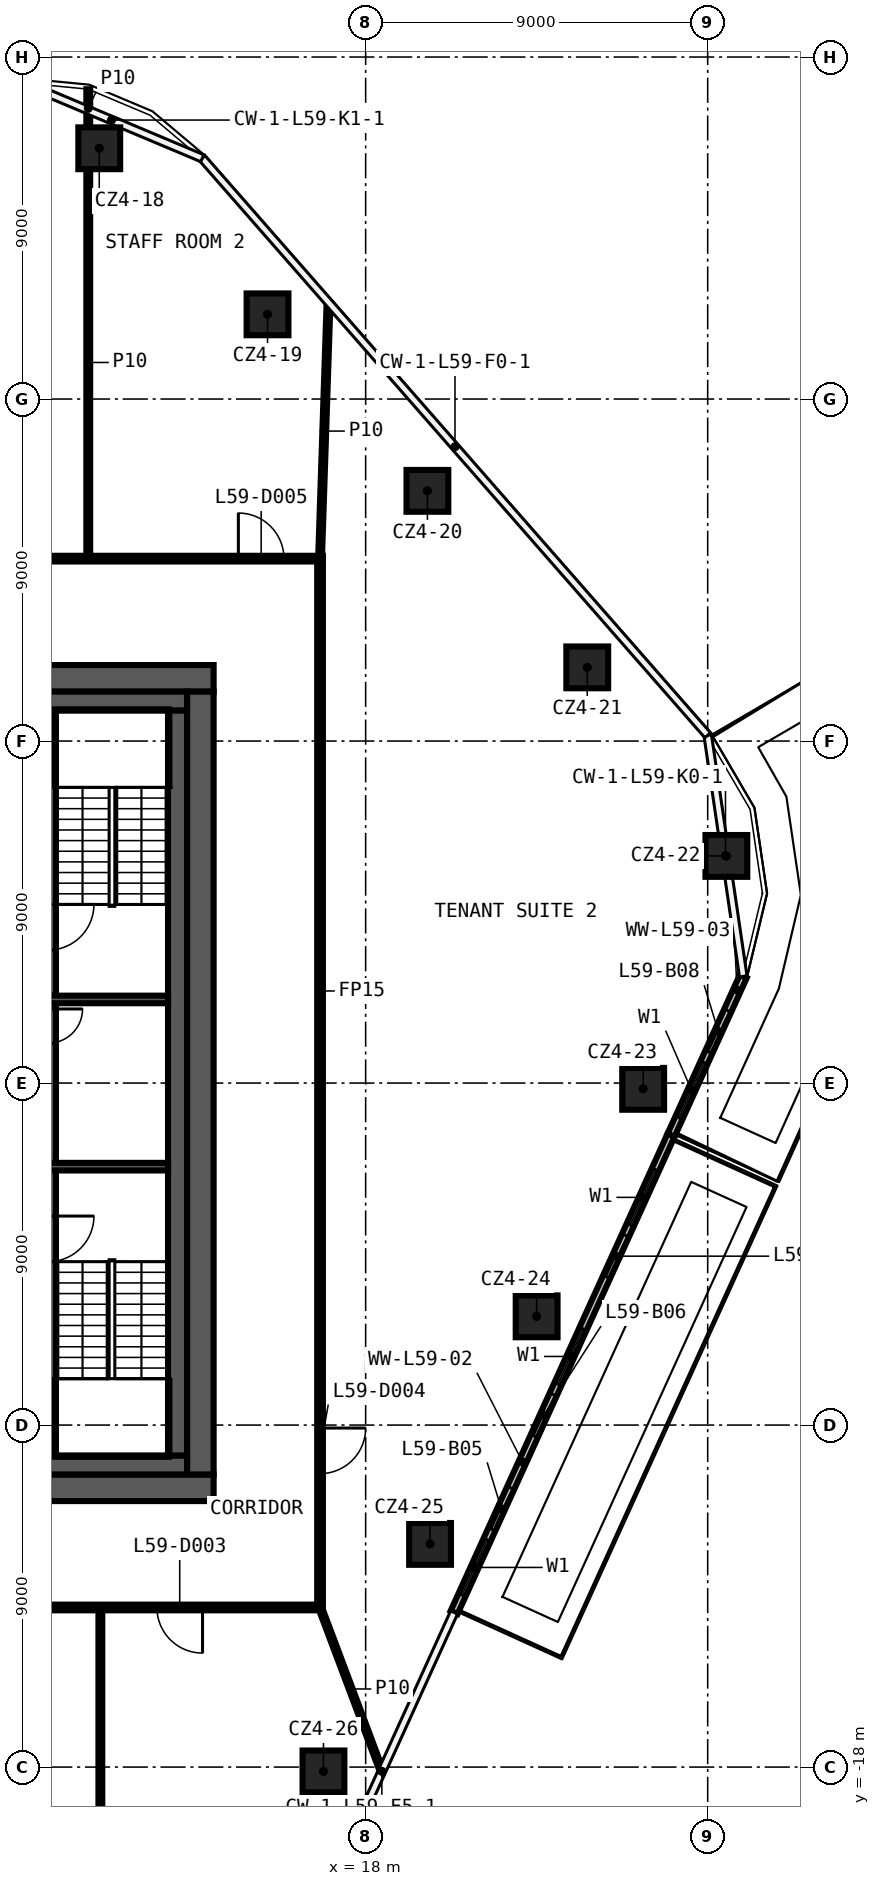
"""IFC4 building model, lengths in metres.
Left out: names, types, materials, properties, quantities, classifications, styles, units other than length and angle.
Written with IfcOpenShell. Run it as: python <this file> out.ifc"""

import sys

from ifc_helpers import new_model, si_unit, direction, frame, frame_2d, origin, origin_2d, place, context, subcontext, project, spatial, rectangle, extrude, element, fill, save


model = new_model("IFC4")
c1 = context("Model", 3, precision=1e-05, world=origin(), true_north=direction((0.0, 1.0)))
c2 = subcontext(c1, "Body", "Model", "MODEL_VIEW")
j1 = project(units=[si_unit("LENGTHUNIT", "METRE"), si_unit("PLANEANGLEUNIT", "RADIAN")], contexts=[c1])
p1 = place(None, origin())
s1 = spatial("IfcSite", under=j1, at=p1, CompositionType="ELEMENT")
p2 = place(p1, origin())
s2 = spatial("IfcBuilding", under=s1, at=p2, CompositionType="ELEMENT")
p3 = place(p2, frame((0.0, 0.0, 279.0)))
s3 = spatial("IfcBuildingStorey", under=s2, at=p3, CompositionType="ELEMENT", Elevation=279.0)
for number, where, z_axis, x_axis in (
    (1, (10.99, 24.599, 0.0), (0.0, 0.0, 1.0), (1.0, 0.0, 0.0)),
    (2, (15.418, 20.229, 0.0), (0.0, 0.0, 1.0), (1.0, 0.0, 0.0)),
    (3, (19.625, 15.584, 0.0), (0.0, 0.0, 1.0), (1.0, 0.0, 0.0)),
    (4, (23.831, 10.939, 0.0), (0.0, 0.0, 1.0), (1.0, 0.0, 0.0)),
    (5, (27.492, 5.977, 0.0), (0.0, 0.0, 1.0), (1.0, 0.0, 0.0)),
    (6, (25.302, -0.152, 0.0), (0.0, 0.0, 1.0), (1.0, 0.0, 0.0)),
    (7, (22.499, -6.139, 0.0), (0.0, 0.0, 1.0), (1.0, 0.0, 0.0)),
    (8, (19.695, -12.127, 0.0), (0.0, 0.0, 1.0), (1.0, 0.0, 0.0)),
    (9, (16.89, -18.114, 0.0), (0.0, 0.0, 1.0), (1.0, 0.0, 0.0)),
):
    element("IfcColumn", number, at=place(p3, frame(where, z_axis=z_axis, x_axis=x_axis)), inside=s3, PredefinedType="COLUMN", context=c2, shape_type="SweptSolid", body=[
        extrude(rectangle(XDim=1.1, YDim=1.1, at=origin_2d()), origin(), (0.0, 0.0, 1.0), 3.6),
    ])
p4 = place(p3, frame((16.875, -13.8, 0.0), z_axis=(0.0, 0.0, 1.0), x_axis=(-1.0, 0.0, 0.0)))
e10 = element("IfcWall", 10, at=p4, inside=s3, PredefinedType="PARTITIONING", context=c2, shape_type="SweptSolid", body=[
    extrude(rectangle(XDim=28.95, YDim=0.15, at=frame_2d((14.475, 0.0))), origin(), (0.0, 0.0, 1.0), 3.6),
])
p5 = place(p4, frame((22.698, 0.0, 0.0)))
e11 = element("IfcOpeningElement", 11, at=p5, cuts=e10, PredefinedType="OPENING", context=c2, shape_type="SweptSolid", body=[
    extrude(rectangle(XDim=1.2, YDim=2.1, at=frame_2d((0.6, 1.05))), frame((0.0, 0.085, 0.0), z_axis=(0.0, -1.0, 0.0), x_axis=(1.0, 0.0, 0.0)), (0.0, 0.0, 1.0), 0.17),
])
p6 = place(p4, frame((12.727, 0.0, 0.0)))
e12 = element("IfcOpeningElement", 12, at=p6, cuts=e10, PredefinedType="OPENING", context=c2, shape_type="SweptSolid", body=[
    extrude(rectangle(XDim=1.2, YDim=2.1, at=frame_2d((0.6, 1.05))), frame((0.0, 0.085, 0.0), z_axis=(0.0, -1.0, 0.0), x_axis=(1.0, 0.0, 0.0)), (0.0, 0.0, 1.0), 0.17),
])
p7 = place(p4, frame((3.167, 0.0, 0.0)))
e13 = element("IfcOpeningElement", 13, at=p7, cuts=e10, PredefinedType="OPENING", context=c2, shape_type="SweptSolid", body=[
    extrude(rectangle(XDim=1.2, YDim=2.1, at=frame_2d((0.6, 1.05))), frame((0.0, 0.085, 0.0), z_axis=(0.0, -1.0, 0.0), x_axis=(1.0, 0.0, 0.0)), (0.0, 0.0, 1.0), 0.17),
])
p8 = place(p3, frame((-12.075, 13.8, 0.0), z_axis=(0.0, 0.0, 1.0), x_axis=(1.0, 0.0, 0.0)))
e14 = element("IfcWall", 14, at=p8, inside=s3, PredefinedType="PARTITIONING", context=c2, shape_type="SweptSolid", body=[
    extrude(rectangle(XDim=28.95, YDim=0.15, at=frame_2d((14.475, 0.0))), origin(), (0.0, 0.0, 1.0), 3.6),
])
p9 = place(p8, frame((26.725, 0.0, 0.0)))
e15 = element("IfcOpeningElement", 15, at=p9, cuts=e14, PredefinedType="OPENING", context=c2, shape_type="SweptSolid", body=[
    extrude(rectangle(XDim=1.2, YDim=2.1, at=frame_2d((0.6, 1.05))), frame((0.0, 0.085, 0.0), z_axis=(0.0, -1.0, 0.0), x_axis=(1.0, 0.0, 0.0)), (0.0, 0.0, 1.0), 0.17),
])
p10 = place(p8, frame((2.445, 0.0, 0.0)))
e16 = element("IfcOpeningElement", 16, at=p10, cuts=e14, PredefinedType="OPENING", context=c2, shape_type="SweptSolid", body=[
    extrude(rectangle(XDim=1.2, YDim=2.1, at=frame_2d((0.6, 1.05))), frame((0.0, 0.085, 0.0), z_axis=(0.0, -1.0, 0.0), x_axis=(1.0, 0.0, 0.0)), (0.0, 0.0, 1.0), 0.17),
])
p11 = place(p3, frame((16.8, 13.8, 0.0), z_axis=(0.0, 0.0, 1.0), x_axis=(0.033145414265, 0.999450539803, 0.0)))
e17 = element("IfcWall", 17, at=p11, inside=s3, PredefinedType="PARTITIONING", context=c2, shape_type="SweptSolid", body=[
    extrude(rectangle(XDim=6.718, YDim=0.1, at=frame_2d((3.359, 0.0))), origin(), (0.0, 0.0, 1.0), 3.6),
])
p12 = place(p3, frame((16.8, 13.725, 0.0), z_axis=(0.0, 0.0, 1.0), x_axis=(0.0, -1.0, 0.0)))
e18 = element("IfcWall", 18, at=p12, inside=s3, PredefinedType="PARTITIONING", context=c2, shape_type="SweptSolid", body=[
    extrude(rectangle(XDim=27.45, YDim=0.15, at=frame_2d((13.725, 0.0))), origin(), (0.0, 0.0, 1.0), 3.6),
])
p13 = place(p12, frame((22.803, 0.0, 0.0)))
e19 = element("IfcOpeningElement", 19, at=p13, cuts=e18, PredefinedType="OPENING", context=c2, shape_type="SweptSolid", body=[
    extrude(rectangle(XDim=1.2, YDim=2.1, at=frame_2d((0.6, 1.05))), frame((0.0, 0.085, 0.0), z_axis=(0.0, -1.0, 0.0), x_axis=(1.0, 0.0, 0.0)), (0.0, 0.0, 1.0), 0.17),
])
p14 = place(p3, frame((11.019, -25.74, 0.0), z_axis=(0.0, 0.0, 1.0), x_axis=(0.0, 1.0, 0.0)))
e20 = element("IfcWall", 20, at=p14, inside=s3, PredefinedType="PARTITIONING", context=c2, shape_type="SweptSolid", body=[
    extrude(rectangle(XDim=11.865, YDim=0.1, at=frame_2d((5.932, 0.0))), origin(), (0.0, 0.0, 1.0), 3.6),
])
p15 = place(p3, frame((10.701, 13.875, 0.0), z_axis=(0.0, 0.0, 1.0), x_axis=(0.0, 1.0, 0.0)))
e21 = element("IfcWall", 21, at=p15, inside=s3, PredefinedType="PARTITIONING", context=c2, shape_type="SweptSolid", body=[
    extrude(rectangle(XDim=10.174, YDim=0.1, at=frame_2d((5.087, 0.0))), origin(), (0.0, 0.0, 1.0), 3.6),
])
p16 = place(p3, frame((10.701, 25.149, 0.0), z_axis=(0.0, 0.0, 1.0), x_axis=(0.0, 1.0, 0.0)))
e22 = element("IfcWall", 22, at=p16, inside=s3, PredefinedType="PARTITIONING", context=c2, shape_type="SweptSolid", body=[
    extrude(rectangle(XDim=1.004, YDim=0.1, at=frame_2d((0.502, 0.0))), origin(), (0.0, 0.0, 1.0), 3.6),
])
p17 = place(p3, frame((16.8, -13.8, 0.0), z_axis=(0.0, 0.0, 1.0), x_axis=(0.352127226584, -0.935952144235, 0.0)))
e23 = element("IfcWall", 23, at=p17, inside=s3, PredefinedType="PARTITIONING", context=c2, shape_type="SweptSolid", body=[
    extrude(rectangle(XDim=4.583, YDim=0.1, at=frame_2d((2.292, 0.0))), origin(), (0.0, 0.0, 1.0), 3.6),
])
p18 = place(p3, frame((20.327, -13.93, 0.0), z_axis=(0.0, 0.0, 1.0), x_axis=(0.413844275504, 0.91034768942, 0.0)))
e24 = element("IfcWall", 24, at=p18, inside=s3, PredefinedType="SOLIDWALL", context=c2, shape_type="SweptSolid", body=[
    extrude(rectangle(XDim=13.796, YDim=0.2, at=frame_2d((6.898, 0.0))), origin(), (0.0, 0.0, 1.0), 3.6),
])
p19 = place(p18, frame((0.5, 0.0, 0.6)))
e25 = element("IfcOpeningElement", 25, at=p19, cuts=e24, PredefinedType="OPENING", context=c2, shape_type="SweptSolid", body=[
    extrude(rectangle(XDim=1.6, YDim=2.4, at=frame_2d((0.8, 1.2))), frame((0.0, 0.11, 0.0), z_axis=(0.0, -1.0, 0.0), x_axis=(1.0, 0.0, 0.0)), (0.0, 0.0, 1.0), 0.22),
])
p20 = place(p18, frame((2.4, 0.0, 0.0)))
e26 = element("IfcOpeningElement", 26, at=p20, cuts=e24, PredefinedType="OPENING", context=c2, shape_type="SweptSolid", body=[
    extrude(rectangle(XDim=1.2, YDim=2.4, at=frame_2d((0.6, 1.2))), frame((0.0, 0.11, 0.0), z_axis=(0.0, -1.0, 0.0), x_axis=(1.0, 0.0, 0.0)), (0.0, 0.0, 1.0), 0.22),
])
p21 = place(p18, frame((6.599, 0.0, 0.6)))
e27 = element("IfcOpeningElement", 27, at=p21, cuts=e24, PredefinedType="OPENING", context=c2, shape_type="SweptSolid", body=[
    extrude(rectangle(XDim=1.6, YDim=2.4, at=frame_2d((0.8, 1.2))), frame((0.0, 0.11, 0.0), z_axis=(0.0, -1.0, 0.0), x_axis=(1.0, 0.0, 0.0)), (0.0, 0.0, 1.0), 0.22),
])
p22 = place(p18, frame((5.099, 0.0, 0.0)))
e28 = element("IfcOpeningElement", 28, at=p22, cuts=e24, PredefinedType="OPENING", context=c2, shape_type="SweptSolid", body=[
    extrude(rectangle(XDim=1.2, YDim=2.4, at=frame_2d((0.6, 1.2))), frame((0.0, 0.11, 0.0), z_axis=(0.0, -1.0, 0.0), x_axis=(1.0, 0.0, 0.0)), (0.0, 0.0, 1.0), 0.22),
])
p23 = place(p18, frame((11.198, 0.0, 0.6)))
e29 = element("IfcOpeningElement", 29, at=p23, cuts=e24, PredefinedType="OPENING", context=c2, shape_type="SweptSolid", body=[
    extrude(rectangle(XDim=1.6, YDim=2.4, at=frame_2d((0.8, 1.2))), frame((0.0, 0.11, 0.0), z_axis=(0.0, -1.0, 0.0), x_axis=(1.0, 0.0, 0.0)), (0.0, 0.0, 1.0), 0.22),
])
p24 = place(p18, frame((9.698, 0.0, 0.0)))
e30 = element("IfcOpeningElement", 30, at=p24, cuts=e24, PredefinedType="OPENING", context=c2, shape_type="SweptSolid", body=[
    extrude(rectangle(XDim=1.2, YDim=2.4, at=frame_2d((0.6, 1.2))), frame((0.0, 0.11, 0.0), z_axis=(0.0, -1.0, 0.0), x_axis=(1.0, 0.0, 0.0)), (0.0, 0.0, 1.0), 0.22),
])
p25 = place(p3, frame((26.037, -1.371, 0.0), z_axis=(0.0, 0.0, 1.0), x_axis=(0.413839017619, 0.910350079637, 0.0)))
e31 = element("IfcWall", 31, at=p25, inside=s3, PredefinedType="SOLIDWALL", context=c2, shape_type="SweptSolid", body=[
    extrude(rectangle(XDim=4.589, YDim=0.2, at=frame_2d((2.294, 0.0))), origin(), (0.0, 0.0, 1.0), 3.6),
])
p26 = place(p25, frame((0.5, 0.0, 0.6)))
e32 = element("IfcOpeningElement", 32, at=p26, cuts=e31, PredefinedType="OPENING", context=c2, shape_type="SweptSolid", body=[
    extrude(rectangle(XDim=1.6, YDim=2.4, at=frame_2d((0.8, 1.2))), frame((0.0, 0.11, 0.0), z_axis=(0.0, -1.0, 0.0), x_axis=(1.0, 0.0, 0.0)), (0.0, 0.0, 1.0), 0.22),
])
p27 = place(p25, frame((2.4, 0.0, 0.0)))
e33 = element("IfcOpeningElement", 33, at=p27, cuts=e31, PredefinedType="OPENING", context=c2, shape_type="SweptSolid", body=[
    extrude(rectangle(XDim=1.2, YDim=2.4, at=frame_2d((0.6, 1.2))), frame((0.0, 0.11, 0.0), z_axis=(0.0, -1.0, 0.0), x_axis=(1.0, 0.0, 0.0)), (0.0, 0.0, 1.0), 0.22),
])
p28 = place(p3, frame((-14.0, 10.65, 0.0), z_axis=(0.0, 0.0, 1.0), x_axis=(1.0, 0.0, 0.0)))
e34 = element("IfcWall", 34, at=p28, inside=s3, PredefinedType="SHEAR", context=c2, shape_type="SweptSolid", body=[
    extrude(rectangle(XDim=28.0, YDim=0.7, at=frame_2d((14.0, 0.0))), origin(), (0.0, 0.0, 1.0), 3.6),
])
p29 = place(p28, frame((15.9, 0.0, 0.0)))
e35 = element("IfcOpeningElement", 35, at=p29, cuts=e34, PredefinedType="OPENING", context=c2, shape_type="SweptSolid", body=[
    extrude(rectangle(XDim=1.6, YDim=2.1, at=frame_2d((0.8, 1.05))), frame((0.0, 0.36, 0.0), z_axis=(0.0, -1.0, 0.0), x_axis=(1.0, 0.0, 0.0)), (0.0, 0.0, 1.0), 0.72),
])
p30 = place(p3, frame((14.0, -10.65, 0.0), z_axis=(0.0, 0.0, 1.0), x_axis=(-1.0, 0.0, 0.0)))
e36 = element("IfcWall", 36, at=p30, inside=s3, PredefinedType="SHEAR", context=c2, shape_type="SweptSolid", body=[
    extrude(rectangle(XDim=28.0, YDim=0.7, at=frame_2d((14.0, 0.0))), origin(), (0.0, 0.0, 1.0), 3.6),
])
p31 = place(p30, frame((5.1, 0.0, 0.0)))
e37 = element("IfcOpeningElement", 37, at=p31, cuts=e36, PredefinedType="OPENING", context=c2, shape_type="SweptSolid", body=[
    extrude(rectangle(XDim=1.6, YDim=2.1, at=frame_2d((0.8, 1.05))), frame((0.0, 0.36, 0.0), z_axis=(0.0, -1.0, 0.0), x_axis=(1.0, 0.0, 0.0)), (0.0, 0.0, 1.0), 0.72),
])
p32 = place(p3, frame((13.65, 10.3, 0.0), z_axis=(0.0, 0.0, 1.0), x_axis=(0.0, -1.0, 0.0)))
e38 = element("IfcWall", 38, at=p32, inside=s3, PredefinedType="SHEAR", context=c2, shape_type="SweptSolid", body=[
    extrude(rectangle(XDim=20.6, YDim=0.7, at=frame_2d((10.3, 0.0))), origin(), (0.0, 0.0, 1.0), 3.6),
])
p33 = place(p3, frame((3.9, 10.05, 0.0), z_axis=(0.0, 0.0, 1.0), x_axis=(1.0, 0.0, 0.0)))
e39 = element("IfcWall", 39, at=p33, inside=s3, PredefinedType="SHEAR", context=c2, shape_type="SweptSolid", body=[
    extrude(rectangle(XDim=9.4, YDim=0.5, at=frame_2d((4.7, 0.0))), origin(), (0.0, 0.0, 1.0), 3.6),
])
p34 = place(p3, frame((13.3, -10.05, 0.0), z_axis=(0.0, 0.0, 1.0), x_axis=(-1.0, 0.0, 0.0)))
e40 = element("IfcWall", 40, at=p34, inside=s3, PredefinedType="SHEAR", context=c2, shape_type="SweptSolid", body=[
    extrude(rectangle(XDim=4.0, YDim=0.5, at=frame_2d((2.0, 0.0))), origin(), (0.0, 0.0, 1.0), 3.6),
])
p35 = place(p3, frame((13.05, 9.8, 0.0), z_axis=(0.0, 0.0, 1.0), x_axis=(0.0, -1.0, 0.0)))
e41 = element("IfcWall", 41, at=p35, inside=s3, PredefinedType="SHEAR", context=c2, shape_type="SweptSolid", body=[
    extrude(rectangle(XDim=19.6, YDim=0.5, at=frame_2d((9.8, 0.0))), origin(), (0.0, 0.0, 1.0), 3.6),
])
p36 = place(p3, frame((9.65, -2.3, 0.0), z_axis=(0.0, 0.0, 1.0), x_axis=(0.0, -1.0, 0.0)))
e42 = element("IfcWall", 42, at=p36, inside=s3, PredefinedType="SHEAR", context=c2, shape_type="SweptSolid", body=[
    extrude(rectangle(XDim=7.5, YDim=0.4, at=frame_2d((3.75, 0.0))), origin(), (0.0, 0.0, 1.0), 3.6),
])
p37 = place(p36, frame((1.2, 0.0, 0.0)))
e43 = element("IfcOpeningElement", 43, at=p37, cuts=e42, PredefinedType="OPENING", context=c2, shape_type="SweptSolid", body=[
    extrude(rectangle(XDim=1.2, YDim=2.1, at=frame_2d((0.6, 1.05))), frame((0.0, 0.21, 0.0), z_axis=(0.0, -1.0, 0.0), x_axis=(1.0, 0.0, 0.0)), (0.0, 0.0, 1.0), 0.42),
])
p38 = place(p3, frame((9.65, 2.1, 0.0), z_axis=(0.0, 0.0, 1.0), x_axis=(0.0, -1.0, 0.0)))
e44 = element("IfcWall", 44, at=p38, inside=s3, PredefinedType="SHEAR", context=c2, shape_type="SweptSolid", body=[
    extrude(rectangle(XDim=4.2, YDim=0.4, at=frame_2d((2.1, 0.0))), origin(), (0.0, 0.0, 1.0), 3.6),
])
p39 = place(p38, frame((0.15, 0.0, 0.0)))
e45 = element("IfcOpeningElement", 45, at=p39, cuts=e44, PredefinedType="OPENING", context=c2, shape_type="SweptSolid", body=[
    extrude(rectangle(XDim=0.9, YDim=2.1, at=frame_2d((0.45, 1.05))), frame((0.0, 0.21, 0.0), z_axis=(0.0, -1.0, 0.0), x_axis=(1.0, 0.0, 0.0)), (0.0, 0.0, 1.0), 0.42),
])
p40 = place(p3, frame((9.65, 9.8, 0.0), z_axis=(0.0, 0.0, 1.0), x_axis=(0.0, -1.0, 0.0)))
e46 = element("IfcWall", 46, at=p40, inside=s3, PredefinedType="SHEAR", context=c2, shape_type="SweptSolid", body=[
    extrude(rectangle(XDim=7.5, YDim=0.4, at=frame_2d((3.75, 0.0))), origin(), (0.0, 0.0, 1.0), 3.6),
])
p41 = place(p40, frame((5.1, 0.0, 0.0)))
e47 = element("IfcOpeningElement", 47, at=p41, cuts=e46, PredefinedType="OPENING", context=c2, shape_type="SweptSolid", body=[
    extrude(rectangle(XDim=1.2, YDim=2.1, at=frame_2d((0.6, 1.05))), frame((0.0, 0.21, 0.0), z_axis=(0.0, -1.0, 0.0), x_axis=(1.0, 0.0, 0.0)), (0.0, 0.0, 1.0), 0.42),
])
for number, where, z_axis, x_axis in (
    (48, (9.45, 2.2, 0.0), (0.0, 0.0, 1.0), (1.0, 0.0, 0.0)),
    (49, (9.45, -2.2, 0.0), (0.0, 0.0, 1.0), (1.0, 0.0, 0.0)),
):
    element("IfcWall", number, at=place(p3, frame(where, z_axis=z_axis, x_axis=x_axis)), inside=s3, PredefinedType="SHEAR", context=c2, shape_type="SweptSolid", body=[
        extrude(rectangle(XDim=3.35, YDim=0.2, at=frame_2d((1.675, 0.0))), origin(), (0.0, 0.0, 1.0), 3.6),
    ])
p42 = place(p7, origin())
e50 = element("IfcDoor", 50, at=p42, inside=s3, OperationType="SINGLE_SWING_RIGHT", PredefinedType="DOOR", context=c2, shape_type="SweptSolid", body=[
    extrude(rectangle(XDim=1.2, YDim=2.1, at=frame_2d((0.6, 1.05))), frame((0.0, 0.025, 0.0), z_axis=(0.0, -1.0, 0.0), x_axis=(1.0, 0.0, 0.0)), (0.0, 0.0, 1.0), 0.05),
])
fill(e13, e50)
p43 = place(p13, origin())
e51 = element("IfcDoor", 51, at=p43, inside=s3, OperationType="SINGLE_SWING_LEFT", PredefinedType="DOOR", context=c2, shape_type="SweptSolid", body=[
    extrude(rectangle(XDim=1.2, YDim=2.1, at=frame_2d((0.6, 1.05))), frame((0.0, 0.025, 0.0), z_axis=(0.0, -1.0, 0.0), x_axis=(1.0, 0.0, 0.0)), (0.0, 0.0, 1.0), 0.05),
])
fill(e19, e51)
p44 = place(p9, origin())
e52 = element("IfcDoor", 52, at=p44, inside=s3, OperationType="SINGLE_SWING_RIGHT", PredefinedType="DOOR", context=c2, shape_type="SweptSolid", body=[
    extrude(rectangle(XDim=1.2, YDim=2.1, at=frame_2d((0.6, 1.05))), frame((0.0, 0.025, 0.0), z_axis=(0.0, -1.0, 0.0), x_axis=(1.0, 0.0, 0.0)), (0.0, 0.0, 1.0), 0.05),
])
fill(e15, e52)
p45 = place(p19, origin())
e53 = element("IfcWindow", 53, at=p45, inside=s3, PartitioningType="SINGLE_PANEL", PredefinedType="WINDOW", context=c2, shape_type="SweptSolid", body=[
    extrude(rectangle(XDim=1.6, YDim=2.4, at=frame_2d((0.8, 1.2))), frame((0.0, 0.03, 0.0), z_axis=(0.0, -1.0, 0.0), x_axis=(1.0, 0.0, 0.0)), (0.0, 0.0, 1.0), 0.06),
])
fill(e25, e53)
p46 = place(p20, origin())
e54 = element("IfcDoor", 54, at=p46, inside=s3, OperationType="SLIDING_TO_LEFT", PredefinedType="DOOR", context=c2, shape_type="SweptSolid", body=[
    extrude(rectangle(XDim=1.2, YDim=2.4, at=frame_2d((0.6, 1.2))), frame((0.0, 0.025, 0.0), z_axis=(0.0, -1.0, 0.0), x_axis=(1.0, 0.0, 0.0)), (0.0, 0.0, 1.0), 0.05),
])
fill(e26, e54)
p47 = place(p21, origin())
e55 = element("IfcWindow", 55, at=p47, inside=s3, PartitioningType="SINGLE_PANEL", PredefinedType="WINDOW", context=c2, shape_type="SweptSolid", body=[
    extrude(rectangle(XDim=1.6, YDim=2.4, at=frame_2d((0.8, 1.2))), frame((0.0, 0.03, 0.0), z_axis=(0.0, -1.0, 0.0), x_axis=(1.0, 0.0, 0.0)), (0.0, 0.0, 1.0), 0.06),
])
fill(e27, e55)
p48 = place(p22, origin())
e56 = element("IfcDoor", 56, at=p48, inside=s3, OperationType="SLIDING_TO_LEFT", PredefinedType="DOOR", context=c2, shape_type="SweptSolid", body=[
    extrude(rectangle(XDim=1.2, YDim=2.4, at=frame_2d((0.6, 1.2))), frame((0.0, 0.025, 0.0), z_axis=(0.0, -1.0, 0.0), x_axis=(1.0, 0.0, 0.0)), (0.0, 0.0, 1.0), 0.05),
])
fill(e28, e56)
p49 = place(p23, origin())
e57 = element("IfcWindow", 57, at=p49, inside=s3, PartitioningType="SINGLE_PANEL", PredefinedType="WINDOW", context=c2, shape_type="SweptSolid", body=[
    extrude(rectangle(XDim=1.6, YDim=2.4, at=frame_2d((0.8, 1.2))), frame((0.0, 0.03, 0.0), z_axis=(0.0, -1.0, 0.0), x_axis=(1.0, 0.0, 0.0)), (0.0, 0.0, 1.0), 0.06),
])
fill(e29, e57)
p50 = place(p24, origin())
e58 = element("IfcDoor", 58, at=p50, inside=s3, OperationType="SLIDING_TO_LEFT", PredefinedType="DOOR", context=c2, shape_type="SweptSolid", body=[
    extrude(rectangle(XDim=1.2, YDim=2.4, at=frame_2d((0.6, 1.2))), frame((0.0, 0.025, 0.0), z_axis=(0.0, -1.0, 0.0), x_axis=(1.0, 0.0, 0.0)), (0.0, 0.0, 1.0), 0.05),
])
fill(e30, e58)
p51 = place(p26, origin())
e59 = element("IfcWindow", 59, at=p51, inside=s3, PartitioningType="SINGLE_PANEL", PredefinedType="WINDOW", context=c2, shape_type="SweptSolid", body=[
    extrude(rectangle(XDim=1.6, YDim=2.4, at=frame_2d((0.8, 1.2))), frame((0.0, 0.03, 0.0), z_axis=(0.0, -1.0, 0.0), x_axis=(1.0, 0.0, 0.0)), (0.0, 0.0, 1.0), 0.06),
])
fill(e32, e59)
p52 = place(p27, origin())
e60 = element("IfcDoor", 60, at=p52, inside=s3, OperationType="SLIDING_TO_LEFT", PredefinedType="DOOR", context=c2, shape_type="SweptSolid", body=[
    extrude(rectangle(XDim=1.2, YDim=2.4, at=frame_2d((0.6, 1.2))), frame((0.0, 0.025, 0.0), z_axis=(0.0, -1.0, 0.0), x_axis=(1.0, 0.0, 0.0)), (0.0, 0.0, 1.0), 0.05),
])
fill(e33, e60)
save(model, sys.argv[1])
